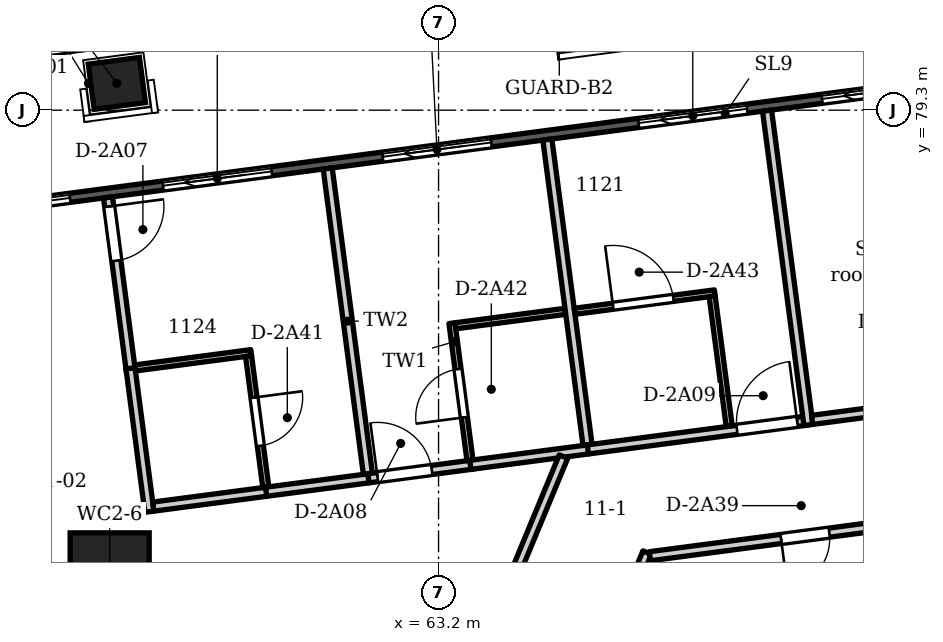
"""IFC4 building model, lengths in metres.
Left out: names, types, materials, properties, quantities, classifications, styles, units other than length and angle.
Written with IfcOpenShell. Run it as: python <this file> out.ifc"""

import sys

from ifc_helpers import new_model, si_unit, direction, frame, frame_2d, origin, origin_2d, place, context, subcontext, project, spatial, polyline, rectangle, circle, outline, extrude, element, fill, save


model = new_model("IFC4")
c1 = context("Model", 3, precision=1e-05, world=origin(), true_north=direction((0.0, 1.0)))
c2 = subcontext(c1, "Body", "Model", "MODEL_VIEW")
j1 = project(units=[si_unit("LENGTHUNIT", "METRE"), si_unit("PLANEANGLEUNIT", "RADIAN")], contexts=[c1])
p1 = place(None, origin())
s1 = spatial("IfcSite", under=j1, at=p1, CompositionType="ELEMENT")
p2 = place(p1, origin())
s2 = spatial("IfcBuilding", under=s1, at=p2, CompositionType="ELEMENT")
p3 = place(p2, frame((0.0, 0.0, 50.4)))
s3 = spatial("IfcBuildingStorey", under=s2, at=p3, CompositionType="ELEMENT", Elevation=50.4)
p4 = place(p3, frame((57.909, 79.741, -0.35), z_axis=(0.0, 0.0, 1.0), x_axis=(0.991444861374, 0.13052619222, 0.0)))
e1 = element("IfcColumn", 1, at=p4, inside=s3, PredefinedType="COLUMN", context=c2, shape_type="SweptSolid", body=[
    extrude(rectangle(XDim=0.85, YDim=0.75, at=origin_2d()), origin(), (0.0, 0.0, 1.0), 3.95),
])
p5 = place(p3, frame((57.791, 71.699, -0.35), z_axis=(0.0, 0.0, 1.0), x_axis=(1.0, 0.0, 0.0)))
e2 = element("IfcColumn", 2, at=p5, inside=s3, PredefinedType="COLUMN", context=c2, shape_type="SweptSolid", body=[
    extrude(circle(Radius=0.65, at=origin_2d()), origin(), (0.0, 0.0, 1.0), 3.95),
])
p6 = place(p3, frame((54.142, 77.465, 0.0), z_axis=(0.0, 0.0, 1.0), x_axis=(0.991444696532, 0.130527444308, 0.0)))
e3 = element("IfcWall", 3, at=p6, inside=s3, PredefinedType="SOLIDWALL", context=c2, shape_type="SweptSolid", body=[
    extrude(outline(polyline([(0.149, 0.075), (0.149, -0.075), (47.217, -0.075), (47.217, 0.075), (0.149, 0.075)])), origin(), (0.0, 0.0, 1.0), 3.3),
])
p7 = place(p6, frame((1.222, 0.0, 0.0)))
e4 = element("IfcOpeningElement", 4, at=p7, cuts=e3, PredefinedType="OPENING", context=c2, shape_type="SweptSolid", body=[
    extrude(rectangle(XDim=1.8, YDim=2.6, at=frame_2d((0.9, 1.3))), frame((0.0, 0.085, 0.0), z_axis=(0.0, -1.0, 0.0), x_axis=(1.0, 0.0, 0.0)), (0.0, 0.0, 1.0), 0.17),
])
p8 = place(p6, frame((4.565, 0.0, 0.0)))
e5 = element("IfcOpeningElement", 5, at=p8, cuts=e3, PredefinedType="OPENING", context=c2, shape_type="SweptSolid", body=[
    extrude(rectangle(XDim=1.8, YDim=2.6, at=frame_2d((0.9, 1.3))), frame((0.0, 0.085, 0.0), z_axis=(0.0, -1.0, 0.0), x_axis=(1.0, 0.0, 0.0)), (0.0, 0.0, 1.0), 0.17),
])
p9 = place(p6, frame((8.209, 0.0, 0.0)))
e6 = element("IfcOpeningElement", 6, at=p9, cuts=e3, PredefinedType="OPENING", context=c2, shape_type="SweptSolid", body=[
    extrude(rectangle(XDim=1.8, YDim=2.6, at=frame_2d((0.9, 1.3))), frame((0.0, 0.085, 0.0), z_axis=(0.0, -1.0, 0.0), x_axis=(1.0, 0.0, 0.0)), (0.0, 0.0, 1.0), 0.17),
])
p10 = place(p6, frame((12.453, 0.0, 0.0)))
e7 = element("IfcOpeningElement", 7, at=p10, cuts=e3, PredefinedType="OPENING", context=c2, shape_type="SweptSolid", body=[
    extrude(rectangle(XDim=1.8, YDim=2.6, at=frame_2d((0.9, 1.3))), frame((0.0, 0.085, 0.0), z_axis=(0.0, -1.0, 0.0), x_axis=(1.0, 0.0, 0.0)), (0.0, 0.0, 1.0), 0.17),
])
p11 = place(p6, frame((15.496, 0.0, 0.0)))
e8 = element("IfcOpeningElement", 8, at=p11, cuts=e3, PredefinedType="OPENING", context=c2, shape_type="SweptSolid", body=[
    extrude(rectangle(XDim=1.8, YDim=2.6, at=frame_2d((0.9, 1.3))), frame((0.0, 0.085, 0.0), z_axis=(0.0, -1.0, 0.0), x_axis=(1.0, 0.0, 0.0)), (0.0, 0.0, 1.0), 0.17),
])
p12 = place(p6, frame((18.84, 0.0, 0.15)))
e9 = element("IfcOpeningElement", 9, at=p12, cuts=e3, PredefinedType="OPENING", context=c2, shape_type="SweptSolid", body=[
    extrude(rectangle(XDim=2.4, YDim=2.45, at=frame_2d((1.2, 1.225))), frame((0.0, 0.085, 0.0), z_axis=(0.0, -1.0, 0.0), x_axis=(1.0, 0.0, 0.0)), (0.0, 0.0, 1.0), 0.17),
])
p13 = place(p6, frame((22.783, 0.0, 0.0)))
e10 = element("IfcOpeningElement", 10, at=p13, cuts=e3, PredefinedType="OPENING", context=c2, shape_type="SweptSolid", body=[
    extrude(rectangle(XDim=1.8, YDim=2.6, at=frame_2d((0.9, 1.3))), frame((0.0, 0.085, 0.0), z_axis=(0.0, -1.0, 0.0), x_axis=(1.0, 0.0, 0.0)), (0.0, 0.0, 1.0), 0.17),
])
p14 = place(p6, frame((26.127, 0.0, 0.15)))
e11 = element("IfcOpeningElement", 11, at=p14, cuts=e3, PredefinedType="OPENING", context=c2, shape_type="SweptSolid", body=[
    extrude(rectangle(XDim=2.4, YDim=2.45, at=frame_2d((1.2, 1.225))), frame((0.0, 0.085, 0.0), z_axis=(0.0, -1.0, 0.0), x_axis=(1.0, 0.0, 0.0)), (0.0, 0.0, 1.0), 0.17),
])
p15 = place(p6, frame((30.071, 0.0, 0.0)))
e12 = element("IfcOpeningElement", 12, at=p15, cuts=e3, PredefinedType="OPENING", context=c2, shape_type="SweptSolid", body=[
    extrude(rectangle(XDim=1.8, YDim=2.6, at=frame_2d((0.9, 1.3))), frame((0.0, 0.085, 0.0), z_axis=(0.0, -1.0, 0.0), x_axis=(1.0, 0.0, 0.0)), (0.0, 0.0, 1.0), 0.17),
])
p16 = place(p6, frame((33.114, 0.0, 0.0)))
e13 = element("IfcOpeningElement", 13, at=p16, cuts=e3, PredefinedType="OPENING", context=c2, shape_type="SweptSolid", body=[
    extrude(rectangle(XDim=1.8, YDim=2.6, at=frame_2d((0.9, 1.3))), frame((0.0, 0.085, 0.0), z_axis=(0.0, -1.0, 0.0), x_axis=(1.0, 0.0, 0.0)), (0.0, 0.0, 1.0), 0.17),
])
p17 = place(p6, frame((37.358, 0.0, 0.0)))
e14 = element("IfcOpeningElement", 14, at=p17, cuts=e3, PredefinedType="OPENING", context=c2, shape_type="SweptSolid", body=[
    extrude(rectangle(XDim=1.8, YDim=2.6, at=frame_2d((0.9, 1.3))), frame((0.0, 0.085, 0.0), z_axis=(0.0, -1.0, 0.0), x_axis=(1.0, 0.0, 0.0)), (0.0, 0.0, 1.0), 0.17),
])
p18 = place(p6, frame((41.001, 0.0, 0.0)))
e15 = element("IfcOpeningElement", 15, at=p18, cuts=e3, PredefinedType="OPENING", context=c2, shape_type="SweptSolid", body=[
    extrude(rectangle(XDim=1.8, YDim=2.6, at=frame_2d((0.9, 1.3))), frame((0.0, 0.085, 0.0), z_axis=(0.0, -1.0, 0.0), x_axis=(1.0, 0.0, 0.0)), (0.0, 0.0, 1.0), 0.17),
])
p19 = place(p6, frame((44.345, 0.0, 0.0)))
e16 = element("IfcOpeningElement", 16, at=p19, cuts=e3, PredefinedType="OPENING", context=c2, shape_type="SweptSolid", body=[
    extrude(rectangle(XDim=1.8, YDim=2.6, at=frame_2d((0.9, 1.3))), frame((0.0, 0.085, 0.0), z_axis=(0.0, -1.0, 0.0), x_axis=(1.0, 0.0, 0.0)), (0.0, 0.0, 1.0), 0.17),
])
p20 = place(p3, frame((57.764, 77.866, 0.0), z_axis=(0.0, 0.0, 1.0), x_axis=(0.130439234834, -0.991456305651, 0.0)))
e17 = element("IfcWall", 17, at=p20, inside=s3, PredefinedType="PARTITIONING", context=c2, shape_type="SweptSolid", body=[
    extrude(rectangle(XDim=2.894, YDim=0.15, at=frame_2d((1.447, 0.0))), origin(), (0.0, 0.0, 1.0), 3.3),
])
p21 = place(p20, frame((0.15, 0.0, 0.0)))
e18 = element("IfcOpeningElement", 18, at=p21, cuts=e17, PredefinedType="OPENING", context=c2, shape_type="SweptSolid", body=[
    extrude(rectangle(XDim=0.9, YDim=2.1, at=frame_2d((0.45, 1.05))), frame((0.0, 0.085, 0.0), z_axis=(0.0, -1.0, 0.0), x_axis=(1.0, 0.0, 0.0)), (0.0, 0.0, 1.0), 0.17),
])
p22 = place(p3, frame((58.134, 75.055, 0.0), z_axis=(0.0, 0.0, 1.0), x_axis=(0.130650971648, -0.991428425862, 0.0)))
e19 = element("IfcWall", 19, at=p22, inside=s3, PredefinedType="PARTITIONING", context=c2, shape_type="SweptSolid", body=[
    extrude(rectangle(XDim=2.379, YDim=0.15, at=frame_2d((1.189, 0.0))), origin(), (0.0, 0.0, 1.0), 3.3),
])
p23 = place(p3, frame((58.209, 75.061, 0.0), z_axis=(0.0, 0.0, 1.0), x_axis=(0.991420604101, 0.130710312382, 0.0)))
e20 = element("IfcWall", 20, at=p23, inside=s3, PredefinedType="PARTITIONING", context=c2, shape_type="SweptSolid", body=[
    extrude(rectangle(XDim=1.926, YDim=0.1, at=frame_2d((0.963, 0.0))), origin(), (0.0, 0.0, 1.0), 3.3),
])
p24 = place(p3, frame((58.51, 72.781, 0.0), z_axis=(0.0, 0.0, 1.0), x_axis=(0.991460041982, 0.130410832196, 0.0)))
e21 = element("IfcWall", 21, at=p24, inside=s3, PredefinedType="PARTITIONING", context=c2, shape_type="SweptSolid", body=[
    extrude(rectangle(XDim=1.88, YDim=0.15, at=frame_2d((0.94, 0.0))), origin(), (0.0, 0.0, 1.0), 3.3),
])
p25 = place(p3, frame((60.075, 75.256, 0.0), z_axis=(0.0, 0.0, 1.0), x_axis=(0.13039935739, -0.991461551242, 0.0)))
e22 = element("IfcWall", 22, at=p25, inside=s3, PredefinedType="PARTITIONING", context=c2, shape_type="SweptSolid", body=[
    extrude(rectangle(XDim=2.176, YDim=0.1, at=frame_2d((1.088, 0.0))), origin(), (0.0, 0.0, 1.0), 3.3),
])
p26 = place(p25, frame((0.688, 0.0, 0.0)))
e23 = element("IfcOpeningElement", 23, at=p26, cuts=e22, PredefinedType="OPENING", context=c2, shape_type="SweptSolid", body=[
    extrude(rectangle(XDim=0.8, YDim=2.1, at=frame_2d((0.4, 1.05))), frame((0.0, 0.06, 0.0), z_axis=(0.0, -1.0, 0.0), x_axis=(1.0, 0.0, 0.0)), (0.0, 0.0, 1.0), 0.12),
])
p27 = place(p3, frame((60.365, 73.025, 0.0), z_axis=(0.0, 0.0, 1.0), x_axis=(0.991474842511, 0.130298260417, 0.0)))
e24 = element("IfcWall", 24, at=p27, inside=s3, PredefinedType="PARTITIONING", context=c2, shape_type="SweptSolid", body=[
    extrude(rectangle(XDim=1.698, YDim=0.15, at=frame_2d((0.849, 0.0))), origin(), (0.0, 0.0, 1.0), 3.3),
])
p28 = place(p3, frame((61.377, 78.341, 0.0), z_axis=(0.0, 0.0, 1.0), x_axis=(0.130499406053, -0.991448387471, 0.0)))
e25 = element("IfcWall", 25, at=p28, inside=s3, PredefinedType="PARTITIONING", context=c2, shape_type="SweptSolid", body=[
    extrude(rectangle(XDim=5.064, YDim=0.15, at=frame_2d((2.532, 0.0))), origin(), (0.0, 0.0, 1.0), 3.3),
])
p29 = place(p3, frame((62.048, 73.246, 0.0), z_axis=(0.0, 0.0, 1.0), x_axis=(0.991412396829, 0.130772548398, 0.0)))
e26 = element("IfcWall", 26, at=p29, inside=s3, PredefinedType="PARTITIONING", context=c2, shape_type="SweptSolid", body=[
    extrude(rectangle(XDim=1.747, YDim=0.15, at=frame_2d((0.874, 0.0))), origin(), (0.0, 0.0, 1.0), 3.3),
])
p30 = place(p29, frame((0.15, 0.0, 0.0)))
e27 = element("IfcOpeningElement", 27, at=p30, cuts=e26, PredefinedType="OPENING", context=c2, shape_type="SweptSolid", body=[
    extrude(rectangle(XDim=0.9, YDim=2.1, at=frame_2d((0.45, 1.05))), frame((0.0, 0.085, 0.0), z_axis=(0.0, -1.0, 0.0), x_axis=(1.0, 0.0, 0.0)), (0.0, 0.0, 1.0), 0.17),
])
p31 = place(p3, frame((63.42, 75.798, 0.0), z_axis=(0.0, 0.0, 1.0), x_axis=(0.130518372124, -0.991445890878, 0.0)))
e28 = element("IfcWall", 28, at=p31, inside=s3, PredefinedType="PARTITIONING", context=c2, shape_type="SweptSolid", body=[
    extrude(rectangle(XDim=2.275, YDim=0.1, at=frame_2d((1.137, 0.0))), origin(), (0.0, 0.0, 1.0), 3.3),
])
p32 = place(p31, frame((0.762, 0.0, 0.0)))
e29 = element("IfcOpeningElement", 29, at=p32, cuts=e28, PredefinedType="OPENING", context=c2, shape_type="SweptSolid", body=[
    extrude(rectangle(XDim=0.8, YDim=2.1, at=frame_2d((0.4, 1.05))), frame((0.0, 0.06, 0.0), z_axis=(0.0, -1.0, 0.0), x_axis=(1.0, 0.0, 0.0)), (0.0, 0.0, 1.0), 0.12),
])
p33 = place(p3, frame((63.477, 75.754, 0.0), z_axis=(0.0, 0.0, 1.0), x_axis=(0.991471592706, 0.13032298668, 0.0)))
e30 = element("IfcWall", 30, at=p33, inside=s3, PredefinedType="PARTITIONING", context=c2, shape_type="SweptSolid", body=[
    extrude(rectangle(XDim=1.825, YDim=0.1, at=frame_2d((0.912, 0.0))), origin(), (0.0, 0.0, 1.0), 3.3),
])
p34 = place(p3, frame((63.723, 73.467, 0.0), z_axis=(0.0, 0.0, 1.0), x_axis=(0.991489487772, 0.130186772134, 0.0)))
e31 = element("IfcWall", 31, at=p34, inside=s3, PredefinedType="PARTITIONING", context=c2, shape_type="SweptSolid", body=[
    extrude(rectangle(XDim=1.958, YDim=0.15, at=frame_2d((0.979, 0.0))), origin(), (0.0, 0.0, 1.0), 3.3),
])
p35 = place(p3, frame((64.454, 71.672, 0.0), z_axis=(0.0, 0.0, 1.0), x_axis=(0.382922635391, 0.923780415091, 0.0)))
e32 = element("IfcWall", 32, at=p35, inside=s3, PredefinedType="PARTITIONING", context=c2, shape_type="SweptSolid", body=[
    extrude(rectangle(XDim=2.09, YDim=0.15, at=frame_2d((1.045, 0.0))), origin(), (0.0, 0.0, 1.0), 3.3),
])
p36 = place(p3, frame((64.989, 78.817, 0.0), z_axis=(0.0, 0.0, 1.0), x_axis=(0.130499406053, -0.991448387471, 0.0)))
e33 = element("IfcWall", 33, at=p36, inside=s3, PredefinedType="PARTITIONING", context=c2, shape_type="SweptSolid", body=[
    extrude(rectangle(XDim=5.064, YDim=0.15, at=frame_2d((2.532, 0.0))), origin(), (0.0, 0.0, 1.0), 3.3),
])
p37 = place(p3, frame((65.438, 75.993, 0.0), z_axis=(0.0, 0.0, 1.0), x_axis=(0.991499984132, 0.130106807916, 0.0)))
e34 = element("IfcWall", 34, at=p37, inside=s3, PredefinedType="PARTITIONING", context=c2, shape_type="SweptSolid", body=[
    extrude(rectangle(XDim=2.325, YDim=0.1, at=frame_2d((1.163, 0.0))), origin(), (0.0, 0.0, 1.0), 3.3),
])
p38 = place(p37, frame((0.637, 0.0, 0.0)))
e35 = element("IfcOpeningElement", 35, at=p38, cuts=e34, PredefinedType="OPENING", context=c2, shape_type="SweptSolid", body=[
    extrude(rectangle(XDim=1.0, YDim=2.1, at=frame_2d((0.5, 1.05))), frame((0.0, 0.06, 0.0), z_axis=(0.0, -1.0, 0.0), x_axis=(1.0, 0.0, 0.0)), (0.0, 0.0, 1.0), 0.12),
])
p39 = place(p3, frame((65.656, 73.721, 0.0), z_axis=(0.0, 0.0, 1.0), x_axis=(0.991433351305, 0.130613590106, 0.0)))
e36 = element("IfcWall", 36, at=p39, inside=s3, PredefinedType="PARTITIONING", context=c2, shape_type="SweptSolid", body=[
    extrude(rectangle(XDim=3.652, YDim=0.15, at=frame_2d((1.826, 0.0))), origin(), (0.0, 0.0, 1.0), 3.3),
])
p40 = place(p39, frame((2.473, 0.0, 0.0)))
e37 = element("IfcOpeningElement", 37, at=p40, cuts=e36, PredefinedType="OPENING", context=c2, shape_type="SweptSolid", body=[
    extrude(rectangle(XDim=1.0, YDim=2.1, at=frame_2d((0.5, 1.05))), frame((0.0, 0.085, 0.0), z_axis=(0.0, -1.0, 0.0), x_axis=(1.0, 0.0, 0.0)), (0.0, 0.0, 1.0), 0.17),
])
p41 = place(p3, frame((65.774, 69.958, 0.0), z_axis=(0.0, 0.0, 1.0), x_axis=(0.382599241046, 0.923914401203, 0.0)))
e38 = element("IfcWall", 38, at=p41, inside=s3, PredefinedType="PARTITIONING", context=c2, shape_type="SweptSolid", body=[
    extrude(rectangle(XDim=2.237, YDim=0.15, at=frame_2d((1.118, 0.0))), origin(), (0.0, 0.0, 1.0), 3.3),
])
p42 = place(p3, frame((66.675, 71.965, 0.0), z_axis=(0.0, 0.0, 1.0), x_axis=(0.991459293276, 0.130416524172, 0.0)))
e39 = element("IfcWall", 39, at=p42, inside=s3, PredefinedType="PARTITIONING", context=c2, shape_type="SweptSolid", body=[
    extrude(rectangle(XDim=5.154, YDim=0.15, at=frame_2d((2.577, 0.0))), origin(), (0.0, 0.0, 1.0), 3.3),
])
p43 = place(p42, frame((2.176, 0.0, 0.0)))
e40 = element("IfcOpeningElement", 40, at=p43, cuts=e39, PredefinedType="OPENING", context=c2, shape_type="SweptSolid", body=[
    extrude(rectangle(XDim=0.8, YDim=2.1, at=frame_2d((0.4, 1.05))), frame((0.0, 0.085, 0.0), z_axis=(0.0, -1.0, 0.0), x_axis=(1.0, 0.0, 0.0)), (0.0, 0.0, 1.0), 0.17),
])
p44 = place(p3, frame((67.699, 76.24, 0.0), z_axis=(0.0, 0.0, 1.0), x_axis=(0.130322595805, -0.991471644084, 0.0)))
e41 = element("IfcWall", 41, at=p44, inside=s3, PredefinedType="PARTITIONING", context=c2, shape_type="SweptSolid", body=[
    extrude(rectangle(XDim=2.154, YDim=0.1, at=frame_2d((1.077, 0.0))), origin(), (0.0, 0.0, 1.0), 3.3),
])
p45 = place(p3, frame((68.602, 79.292, 0.0), z_axis=(0.0, 0.0, 1.0), x_axis=(0.130516294002, -0.991446164449, 0.0)))
e42 = element("IfcWall", 42, at=p45, inside=s3, PredefinedType="PARTITIONING", context=c2, shape_type="SweptSolid", body=[
    extrude(rectangle(XDim=5.213, YDim=0.15, at=frame_2d((2.607, 0.0))), origin(), (0.0, 0.0, 1.0), 3.3),
])
p46 = place(p3, frame((68.721, 68.737, 0.0), z_axis=(0.0, 0.0, 1.0), x_axis=(0.499855260579, 0.866108953002, 0.0)))
e43 = element("IfcWall", 43, at=p46, inside=s3, PredefinedType="PARTITIONING", context=c2, shape_type="SweptSolid", body=[
    extrude(rectangle(XDim=3.766, YDim=0.15, at=frame_2d((1.883, 0.0))), origin(), (0.0, 0.0, 1.0), 3.3),
])
p47 = place(p3, frame((69.344, 74.207, 0.0), z_axis=(0.0, 0.0, 1.0), x_axis=(0.991427646688, 0.130656884173, 0.0)))
e44 = element("IfcWall", 44, at=p47, inside=s3, PredefinedType="PARTITIONING", context=c2, shape_type="SweptSolid", body=[
    extrude(rectangle(XDim=3.651, YDim=0.15, at=frame_2d((1.826, 0.0))), origin(), (0.0, 0.0, 1.0), 3.3),
])
p48 = place(p47, frame((1.286, 0.0, 0.0)))
e45 = element("IfcOpeningElement", 45, at=p48, cuts=e44, PredefinedType="OPENING", context=c2, shape_type="SweptSolid", body=[
    extrude(rectangle(XDim=1.0, YDim=2.1, at=frame_2d((0.5, 1.05))), frame((0.0, 0.085, 0.0), z_axis=(0.0, -1.0, 0.0), x_axis=(1.0, 0.0, 0.0)), (0.0, 0.0, 1.0), 0.17),
])
p49 = place(p7, origin())
e46 = element("IfcDoor", 46, at=p49, inside=s3, OperationType="SLIDING_TO_LEFT", PredefinedType="DOOR", context=c2, shape_type="SweptSolid", body=[
    extrude(rectangle(XDim=1.8, YDim=2.6, at=frame_2d((0.9, 1.3))), frame((0.0, 0.025, 0.0), z_axis=(0.0, -1.0, 0.0), x_axis=(1.0, 0.0, 0.0)), (0.0, 0.0, 1.0), 0.05),
])
fill(e4, e46)
p50 = place(p8, origin())
e47 = element("IfcDoor", 47, at=p50, inside=s3, OperationType="SLIDING_TO_LEFT", PredefinedType="DOOR", context=c2, shape_type="SweptSolid", body=[
    extrude(rectangle(XDim=1.8, YDim=2.6, at=frame_2d((0.9, 1.3))), frame((0.0, 0.025, 0.0), z_axis=(0.0, -1.0, 0.0), x_axis=(1.0, 0.0, 0.0)), (0.0, 0.0, 1.0), 0.05),
])
fill(e5, e47)
p51 = place(p9, origin())
e48 = element("IfcDoor", 48, at=p51, inside=s3, OperationType="SLIDING_TO_LEFT", PredefinedType="DOOR", context=c2, shape_type="SweptSolid", body=[
    extrude(rectangle(XDim=1.8, YDim=2.6, at=frame_2d((0.9, 1.3))), frame((0.0, 0.025, 0.0), z_axis=(0.0, -1.0, 0.0), x_axis=(1.0, 0.0, 0.0)), (0.0, 0.0, 1.0), 0.05),
])
fill(e6, e48)
p52 = place(p10, origin())
e49 = element("IfcDoor", 49, at=p52, inside=s3, OperationType="SLIDING_TO_LEFT", PredefinedType="DOOR", context=c2, shape_type="SweptSolid", body=[
    extrude(rectangle(XDim=1.8, YDim=2.6, at=frame_2d((0.9, 1.3))), frame((0.0, 0.025, 0.0), z_axis=(0.0, -1.0, 0.0), x_axis=(1.0, 0.0, 0.0)), (0.0, 0.0, 1.0), 0.05),
])
fill(e7, e49)
p53 = place(p11, origin())
e50 = element("IfcDoor", 50, at=p53, inside=s3, OperationType="SLIDING_TO_LEFT", PredefinedType="DOOR", context=c2, shape_type="SweptSolid", body=[
    extrude(rectangle(XDim=1.8, YDim=2.6, at=frame_2d((0.9, 1.3))), frame((0.0, 0.025, 0.0), z_axis=(0.0, -1.0, 0.0), x_axis=(1.0, 0.0, 0.0)), (0.0, 0.0, 1.0), 0.05),
])
fill(e8, e50)
p54 = place(p21, origin())
e51 = element("IfcDoor", 51, at=p54, inside=s3, OperationType="SINGLE_SWING_LEFT", PredefinedType="DOOR", context=c2, shape_type="SweptSolid", body=[
    extrude(rectangle(XDim=0.9, YDim=2.1, at=frame_2d((0.45, 1.05))), frame((0.0, 0.025, 0.0), z_axis=(0.0, -1.0, 0.0), x_axis=(1.0, 0.0, 0.0)), (0.0, 0.0, 1.0), 0.05),
])
fill(e18, e51)
p55 = place(p30, origin())
e52 = element("IfcDoor", 52, at=p55, inside=s3, OperationType="SINGLE_SWING_LEFT", PredefinedType="DOOR", context=c2, shape_type="SweptSolid", body=[
    extrude(rectangle(XDim=0.9, YDim=2.1, at=frame_2d((0.45, 1.05))), frame((0.0, 0.025, 0.0), z_axis=(0.0, -1.0, 0.0), x_axis=(1.0, 0.0, 0.0)), (0.0, 0.0, 1.0), 0.05),
])
fill(e27, e52)
p56 = place(p40, origin())
e53 = element("IfcDoor", 53, at=p56, inside=s3, OperationType="SINGLE_SWING_RIGHT", PredefinedType="DOOR", context=c2, shape_type="SweptSolid", body=[
    extrude(rectangle(XDim=1.0, YDim=2.1, at=frame_2d((0.5, 1.05))), frame((0.0, 0.025, 0.0), z_axis=(0.0, -1.0, 0.0), x_axis=(1.0, 0.0, 0.0)), (0.0, 0.0, 1.0), 0.05),
])
fill(e37, e53)
p57 = place(p43, frame((0.8, 0.0, 0.0), z_axis=(0.0, 0.0, 1.0), x_axis=(-1.0, 0.0, 0.0)))
e54 = element("IfcDoor", 54, at=p57, inside=s3, OperationType="SINGLE_SWING_RIGHT", PredefinedType="DOOR", context=c2, shape_type="SweptSolid", body=[
    extrude(rectangle(XDim=0.8, YDim=2.1, at=frame_2d((0.4, 1.05))), frame((0.0, 0.025, 0.0), z_axis=(0.0, -1.0, 0.0), x_axis=(1.0, 0.0, 0.0)), (0.0, 0.0, 1.0), 0.05),
])
fill(e40, e54)
p58 = place(p26, origin())
e55 = element("IfcDoor", 55, at=p58, inside=s3, OperationType="SINGLE_SWING_LEFT", PredefinedType="DOOR", context=c2, shape_type="SweptSolid", body=[
    extrude(rectangle(XDim=0.8, YDim=2.1, at=frame_2d((0.4, 1.05))), frame((0.0, 0.025, 0.0), z_axis=(0.0, -1.0, 0.0), x_axis=(1.0, 0.0, 0.0)), (0.0, 0.0, 1.0), 0.05),
])
fill(e23, e55)
p59 = place(p32, frame((0.8, 0.0, 0.0), z_axis=(0.0, 0.0, 1.0), x_axis=(-1.0, 0.0, 0.0)))
e56 = element("IfcDoor", 56, at=p59, inside=s3, OperationType="SINGLE_SWING_LEFT", PredefinedType="DOOR", context=c2, shape_type="SweptSolid", body=[
    extrude(rectangle(XDim=0.8, YDim=2.1, at=frame_2d((0.4, 1.05))), frame((0.0, 0.025, 0.0), z_axis=(0.0, -1.0, 0.0), x_axis=(1.0, 0.0, 0.0)), (0.0, 0.0, 1.0), 0.05),
])
fill(e29, e56)
p60 = place(p38, origin())
e57 = element("IfcDoor", 57, at=p60, inside=s3, OperationType="SINGLE_SWING_LEFT", PredefinedType="DOOR", context=c2, shape_type="SweptSolid", body=[
    extrude(rectangle(XDim=1.0, YDim=2.1, at=frame_2d((0.5, 1.05))), frame((0.0, 0.025, 0.0), z_axis=(0.0, -1.0, 0.0), x_axis=(1.0, 0.0, 0.0)), (0.0, 0.0, 1.0), 0.05),
])
fill(e35, e57)
save(model, sys.argv[1])
